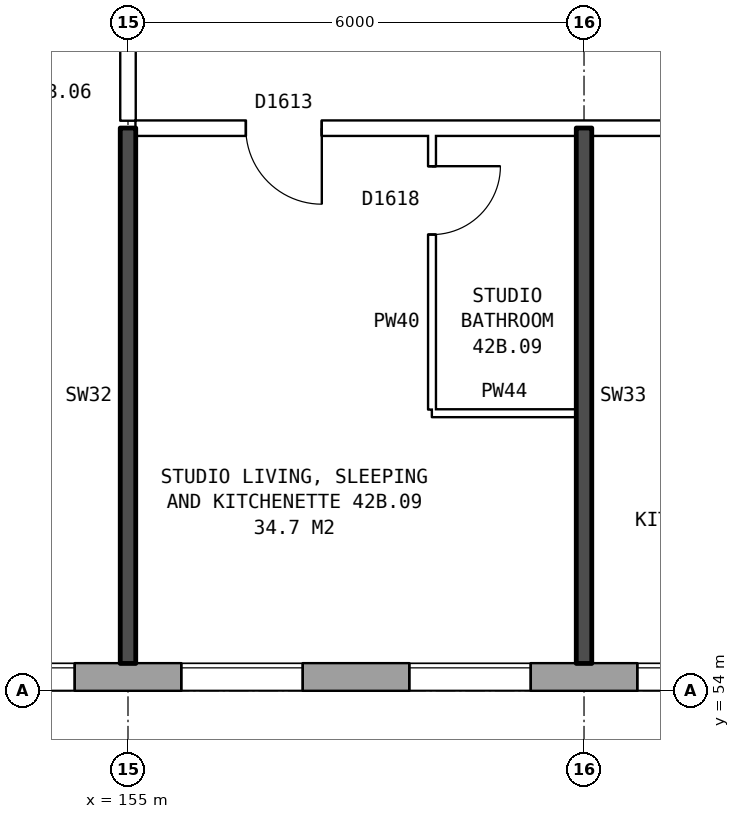
"""IFC4 building model, lengths in metres.
Left out: names, types, materials, properties, quantities, classifications, styles, units other than length and angle.
Written with IfcOpenShell. Run it as: python <this file> out.ifc"""

import sys

from ifc_helpers import new_model, si_unit, direction, frame, frame_2d, origin, place, context, subcontext, project, spatial, rectangle, extrude, element, fill, save


model = new_model("IFC4")
c1 = context("Model", 3, precision=1e-05, world=origin(), true_north=direction((0.0, 1.0)))
c2 = subcontext(c1, "Body", "Model", "MODEL_VIEW")
j1 = project(units=[si_unit("LENGTHUNIT", "METRE"), si_unit("PLANEANGLEUNIT", "RADIAN")], contexts=[c1])
p1 = place(None, origin())
s1 = spatial("IfcSite", under=j1, at=p1, CompositionType="ELEMENT")
p2 = place(p1, origin())
s2 = spatial("IfcBuilding", under=s1, at=p2, CompositionType="ELEMENT")
p3 = place(p2, frame((0.0, 0.0, 151.6)))
s3 = spatial("IfcBuildingStorey", under=s2, at=p3, CompositionType="ELEMENT", Elevation=151.6)
p4 = place(p3, frame((134.075, 54.18, 0.0), z_axis=(0.0, 0.0, 1.0), x_axis=(1.0, 0.0, 0.0)))
e1 = element("IfcWall", 1, at=p4, inside=s3, PredefinedType="STANDARD", context=c2, shape_type="SweptSolid", body=[
    extrude(rectangle(XDim=34.351, YDim=0.36, at=frame_2d((17.175, 0.0))), origin(), (0.0, 0.0, 1.0), 2.85),
])
p5 = place(p4, frame((0.3, 0.0, 0.8)))
e2 = element("IfcOpeningElement", 2, at=p5, cuts=e1, PredefinedType="OPENING", context=c2, shape_type="SweptSolid", body=[
    extrude(rectangle(XDim=0.8, YDim=1.8, at=frame_2d((0.4, 0.9))), frame((0.0, 0.19, 0.0), z_axis=(0.0, -1.0, 0.0), x_axis=(1.0, 0.0, 0.0)), (0.0, 0.0, 1.0), 0.38),
])
p6 = place(p4, frame((3.575, 0.0, 0.8)))
e3 = element("IfcOpeningElement", 3, at=p6, cuts=e1, PredefinedType="OPENING", context=c2, shape_type="SweptSolid", body=[
    extrude(rectangle(XDim=1.0, YDim=1.2, at=frame_2d((0.5, 0.6))), frame((0.0, 0.19, 0.0), z_axis=(0.0, -1.0, 0.0), x_axis=(1.0, 0.0, 0.0)), (0.0, 0.0, 1.0), 0.38),
])
p7 = place(p4, frame((6.625, 0.0, 0.8)))
e4 = element("IfcOpeningElement", 4, at=p7, cuts=e1, PredefinedType="OPENING", context=c2, shape_type="SweptSolid", body=[
    extrude(rectangle(XDim=1.6, YDim=1.8, at=frame_2d((0.8, 0.9))), frame((0.0, 0.19, 0.0), z_axis=(0.0, -1.0, 0.0), x_axis=(1.0, 0.0, 0.0)), (0.0, 0.0, 1.0), 0.38),
])
p8 = place(p4, frame((9.625, 0.0, 0.8)))
e5 = element("IfcOpeningElement", 5, at=p8, cuts=e1, PredefinedType="OPENING", context=c2, shape_type="SweptSolid", body=[
    extrude(rectangle(XDim=1.6, YDim=1.8, at=frame_2d((0.8, 0.9))), frame((0.0, 0.19, 0.0), z_axis=(0.0, -1.0, 0.0), x_axis=(1.0, 0.0, 0.0)), (0.0, 0.0, 1.0), 0.38),
])
p9 = place(p4, frame((12.625, 0.0, 0.8)))
e6 = element("IfcOpeningElement", 6, at=p9, cuts=e1, PredefinedType="OPENING", context=c2, shape_type="SweptSolid", body=[
    extrude(rectangle(XDim=1.6, YDim=1.8, at=frame_2d((0.8, 0.9))), frame((0.0, 0.19, 0.0), z_axis=(0.0, -1.0, 0.0), x_axis=(1.0, 0.0, 0.0)), (0.0, 0.0, 1.0), 0.38),
])
p10 = place(p4, frame((15.625, 0.0, 0.8)))
e7 = element("IfcOpeningElement", 7, at=p10, cuts=e1, PredefinedType="OPENING", context=c2, shape_type="SweptSolid", body=[
    extrude(rectangle(XDim=1.6, YDim=1.8, at=frame_2d((0.8, 0.9))), frame((0.0, 0.19, 0.0), z_axis=(0.0, -1.0, 0.0), x_axis=(1.0, 0.0, 0.0)), (0.0, 0.0, 1.0), 0.38),
])
p11 = place(p4, frame((18.625, 0.0, 0.8)))
e8 = element("IfcOpeningElement", 8, at=p11, cuts=e1, PredefinedType="OPENING", context=c2, shape_type="SweptSolid", body=[
    extrude(rectangle(XDim=1.6, YDim=1.8, at=frame_2d((0.8, 0.9))), frame((0.0, 0.19, 0.0), z_axis=(0.0, -1.0, 0.0), x_axis=(1.0, 0.0, 0.0)), (0.0, 0.0, 1.0), 0.38),
])
p12 = place(p4, frame((21.625, 0.0, 0.8)))
e9 = element("IfcOpeningElement", 9, at=p12, cuts=e1, PredefinedType="OPENING", context=c2, shape_type="SweptSolid", body=[
    extrude(rectangle(XDim=1.6, YDim=1.8, at=frame_2d((0.8, 0.9))), frame((0.0, 0.19, 0.0), z_axis=(0.0, -1.0, 0.0), x_axis=(1.0, 0.0, 0.0)), (0.0, 0.0, 1.0), 0.38),
])
p13 = place(p4, frame((24.625, 0.0, 0.8)))
e10 = element("IfcOpeningElement", 10, at=p13, cuts=e1, PredefinedType="OPENING", context=c2, shape_type="SweptSolid", body=[
    extrude(rectangle(XDim=1.6, YDim=1.8, at=frame_2d((0.8, 0.9))), frame((0.0, 0.19, 0.0), z_axis=(0.0, -1.0, 0.0), x_axis=(1.0, 0.0, 0.0)), (0.0, 0.0, 1.0), 0.38),
])
p14 = place(p4, frame((27.625, 0.0, 0.8)))
e11 = element("IfcOpeningElement", 11, at=p14, cuts=e1, PredefinedType="OPENING", context=c2, shape_type="SweptSolid", body=[
    extrude(rectangle(XDim=1.6, YDim=1.8, at=frame_2d((0.8, 0.9))), frame((0.0, 0.19, 0.0), z_axis=(0.0, -1.0, 0.0), x_axis=(1.0, 0.0, 0.0)), (0.0, 0.0, 1.0), 0.38),
])
p15 = place(p4, frame((29.525, 0.0, 0.8)))
e12 = element("IfcOpeningElement", 12, at=p15, cuts=e1, PredefinedType="OPENING", context=c2, shape_type="SweptSolid", body=[
    extrude(rectangle(XDim=0.6, YDim=1.8, at=frame_2d((0.3, 0.9))), frame((0.0, 0.19, 0.0), z_axis=(0.0, -1.0, 0.0), x_axis=(1.0, 0.0, 0.0)), (0.0, 0.0, 1.0), 0.38),
])
p16 = place(p4, frame((1.4, 0.0, 1.6)))
e13 = element("IfcOpeningElement", 13, at=p16, cuts=e1, PredefinedType="OPENING", context=c2, shape_type="SweptSolid", body=[
    extrude(rectangle(XDim=0.6, YDim=0.9, at=frame_2d((0.3, 0.45))), frame((0.0, 0.19, 0.0), z_axis=(0.0, -1.0, 0.0), x_axis=(1.0, 0.0, 0.0)), (0.0, 0.0, 1.0), 0.38),
])
p17 = place(p4, frame((4.875, 0.0, 0.8)))
e14 = element("IfcOpeningElement", 14, at=p17, cuts=e1, PredefinedType="OPENING", context=c2, shape_type="SweptSolid", body=[
    extrude(rectangle(XDim=1.4, YDim=1.8, at=frame_2d((0.7, 0.9))), frame((0.0, 0.19, 0.0), z_axis=(0.0, -1.0, 0.0), x_axis=(1.0, 0.0, 0.0)), (0.0, 0.0, 1.0), 0.38),
])
p18 = place(p4, frame((30.425, 0.0, 0.8)))
e15 = element("IfcOpeningElement", 15, at=p18, cuts=e1, PredefinedType="OPENING", context=c2, shape_type="SweptSolid", body=[
    extrude(rectangle(XDim=0.6, YDim=0.9, at=frame_2d((0.3, 0.45))), frame((0.0, 0.19, 0.0), z_axis=(0.0, -1.0, 0.0), x_axis=(1.0, 0.0, 0.0)), (0.0, 0.0, 1.0), 0.38),
])
p19 = place(p3, frame((159.0, 57.65, 0.0), z_axis=(0.0, 0.0, 1.0), x_axis=(1.0, 0.0, 0.0)))
e16 = element("IfcWall", 16, at=p19, inside=s3, PredefinedType="PARTITIONING", context=c2, shape_type="SweptSolid", body=[
    extrude(rectangle(XDim=1.9, YDim=0.1, at=frame_2d((0.95, 0.0))), origin(), (0.0, 0.0, 1.0), 2.85),
])
p20 = place(p3, frame((155.1, 61.4, 0.0), z_axis=(0.0, 0.0, 1.0), x_axis=(1.0, 0.0, 0.0)))
e17 = element("IfcWall", 17, at=p20, inside=s3, PredefinedType="PARTITIONING", context=c2, shape_type="SweptSolid", body=[
    extrude(rectangle(XDim=16.04, YDim=0.2, at=frame_2d((8.02, 0.0))), origin(), (0.0, 0.0, 1.0), 2.85),
])
p21 = place(p20, frame((1.45, 0.0, 0.0)))
e18 = element("IfcOpeningElement", 18, at=p21, cuts=e17, PredefinedType="OPENING", context=c2, shape_type="SweptSolid", body=[
    extrude(rectangle(XDim=1.0, YDim=2.1, at=frame_2d((0.5, 1.05))), frame((0.0, 0.11, 0.0), z_axis=(0.0, -1.0, 0.0), x_axis=(1.0, 0.0, 0.0)), (0.0, 0.0, 1.0), 0.22),
])
p22 = place(p20, frame((8.4, 0.0, 0.0)))
e19 = element("IfcOpeningElement", 19, at=p22, cuts=e17, PredefinedType="OPENING", context=c2, shape_type="SweptSolid", body=[
    extrude(rectangle(XDim=1.0, YDim=2.1, at=frame_2d((0.5, 1.05))), frame((0.0, 0.11, 0.0), z_axis=(0.0, -1.0, 0.0), x_axis=(1.0, 0.0, 0.0)), (0.0, 0.0, 1.0), 0.22),
])
p23 = place(p3, frame((155.0, 54.36, 0.0), z_axis=(0.0, 0.0, 1.0), x_axis=(0.0, 1.0, 0.0)))
e20 = element("IfcWall", 20, at=p23, inside=s3, PredefinedType="SOLIDWALL", context=c2, shape_type="SweptSolid", body=[
    extrude(rectangle(XDim=7.04, YDim=0.2, at=frame_2d((3.52, 0.0))), origin(), (0.0, 0.0, 1.0), 2.85),
])
p24 = place(p3, frame((155.0, 61.5, 0.0), z_axis=(0.0, 0.0, 1.0), x_axis=(0.0, 1.0, 0.0)))
e21 = element("IfcWall", 21, at=p24, inside=s3, PredefinedType="PARTITIONING", context=c2, shape_type="SweptSolid", body=[
    extrude(rectangle(XDim=2.2, YDim=0.2, at=frame_2d((1.1, 0.0))), origin(), (0.0, 0.0, 1.0), 2.85),
])
p25 = place(p3, frame((159.0, 57.7, 0.0), z_axis=(0.0, 0.0, 1.0), x_axis=(0.0, 1.0, 0.0)))
e22 = element("IfcWall", 22, at=p25, inside=s3, PredefinedType="PARTITIONING", context=c2, shape_type="SweptSolid", body=[
    extrude(rectangle(XDim=3.6, YDim=0.1, at=frame_2d((1.8, 0.0))), origin(), (0.0, 0.0, 1.0), 2.85),
])
p26 = place(p25, frame((2.3, 0.0, 0.0)))
e23 = element("IfcOpeningElement", 23, at=p26, cuts=e22, PredefinedType="OPENING", context=c2, shape_type="SweptSolid", body=[
    extrude(rectangle(XDim=0.9, YDim=2.1, at=frame_2d((0.45, 1.05))), frame((0.0, 0.06, 0.0), z_axis=(0.0, -1.0, 0.0), x_axis=(1.0, 0.0, 0.0)), (0.0, 0.0, 1.0), 0.12),
])
p27 = place(p3, frame((161.0, 54.36, 0.0), z_axis=(0.0, 0.0, 1.0), x_axis=(0.0, 1.0, 0.0)))
e24 = element("IfcWall", 24, at=p27, inside=s3, PredefinedType="SOLIDWALL", context=c2, shape_type="SweptSolid", body=[
    extrude(rectangle(XDim=7.04, YDim=0.2, at=frame_2d((3.52, 0.0))), origin(), (0.0, 0.0, 1.0), 2.85),
])
p28 = place(p11, origin())
e25 = element("IfcWindow", 25, at=p28, inside=s3, PartitioningType="SINGLE_PANEL", PredefinedType="WINDOW", context=c2, shape_type="SweptSolid", body=[
    extrude(rectangle(XDim=1.6, YDim=1.8, at=frame_2d((0.8, 0.9))), frame((0.0, 0.15, 0.0), z_axis=(0.0, -1.0, 0.0), x_axis=(1.0, 0.0, 0.0)), (0.0, 0.0, 1.0), 0.06),
])
fill(e8, e25)
p29 = place(p12, origin())
e26 = element("IfcWindow", 26, at=p29, inside=s3, PartitioningType="SINGLE_PANEL", PredefinedType="WINDOW", context=c2, shape_type="SweptSolid", body=[
    extrude(rectangle(XDim=1.6, YDim=1.8, at=frame_2d((0.8, 0.9))), frame((0.0, 0.15, 0.0), z_axis=(0.0, -1.0, 0.0), x_axis=(1.0, 0.0, 0.0)), (0.0, 0.0, 1.0), 0.06),
])
fill(e9, e26)
p30 = place(p13, origin())
e27 = element("IfcWindow", 27, at=p30, inside=s3, PartitioningType="SINGLE_PANEL", PredefinedType="WINDOW", context=c2, shape_type="SweptSolid", body=[
    extrude(rectangle(XDim=1.6, YDim=1.8, at=frame_2d((0.8, 0.9))), frame((0.0, 0.15, 0.0), z_axis=(0.0, -1.0, 0.0), x_axis=(1.0, 0.0, 0.0)), (0.0, 0.0, 1.0), 0.06),
])
fill(e10, e27)
p31 = place(p14, origin())
e28 = element("IfcWindow", 28, at=p31, inside=s3, PartitioningType="SINGLE_PANEL", PredefinedType="WINDOW", context=c2, shape_type="SweptSolid", body=[
    extrude(rectangle(XDim=1.6, YDim=1.8, at=frame_2d((0.8, 0.9))), frame((0.0, 0.15, 0.0), z_axis=(0.0, -1.0, 0.0), x_axis=(1.0, 0.0, 0.0)), (0.0, 0.0, 1.0), 0.06),
])
fill(e11, e28)
p32 = place(p21, frame((1.0, 0.0, 0.0), z_axis=(0.0, 0.0, 1.0), x_axis=(-1.0, 0.0, 0.0)))
e29 = element("IfcDoor", 29, at=p32, inside=s3, OperationType="SINGLE_SWING_LEFT", PredefinedType="DOOR", context=c2, shape_type="SweptSolid", body=[
    extrude(rectangle(XDim=1.0, YDim=2.1, at=frame_2d((0.5, 1.05))), frame((0.0, 0.025, 0.0), z_axis=(0.0, -1.0, 0.0), x_axis=(1.0, 0.0, 0.0)), (0.0, 0.0, 1.0), 0.05),
])
fill(e18, e29)
p33 = place(p26, frame((0.9, 0.0, 0.0), z_axis=(0.0, 0.0, 1.0), x_axis=(-1.0, 0.0, 0.0)))
e30 = element("IfcDoor", 30, at=p33, inside=s3, OperationType="SINGLE_SWING_LEFT", PredefinedType="DOOR", context=c2, shape_type="SweptSolid", body=[
    extrude(rectangle(XDim=0.9, YDim=2.1, at=frame_2d((0.45, 1.05))), frame((0.0, 0.025, 0.0), z_axis=(0.0, -1.0, 0.0), x_axis=(1.0, 0.0, 0.0)), (0.0, 0.0, 1.0), 0.05),
])
fill(e23, e30)
save(model, sys.argv[1])
